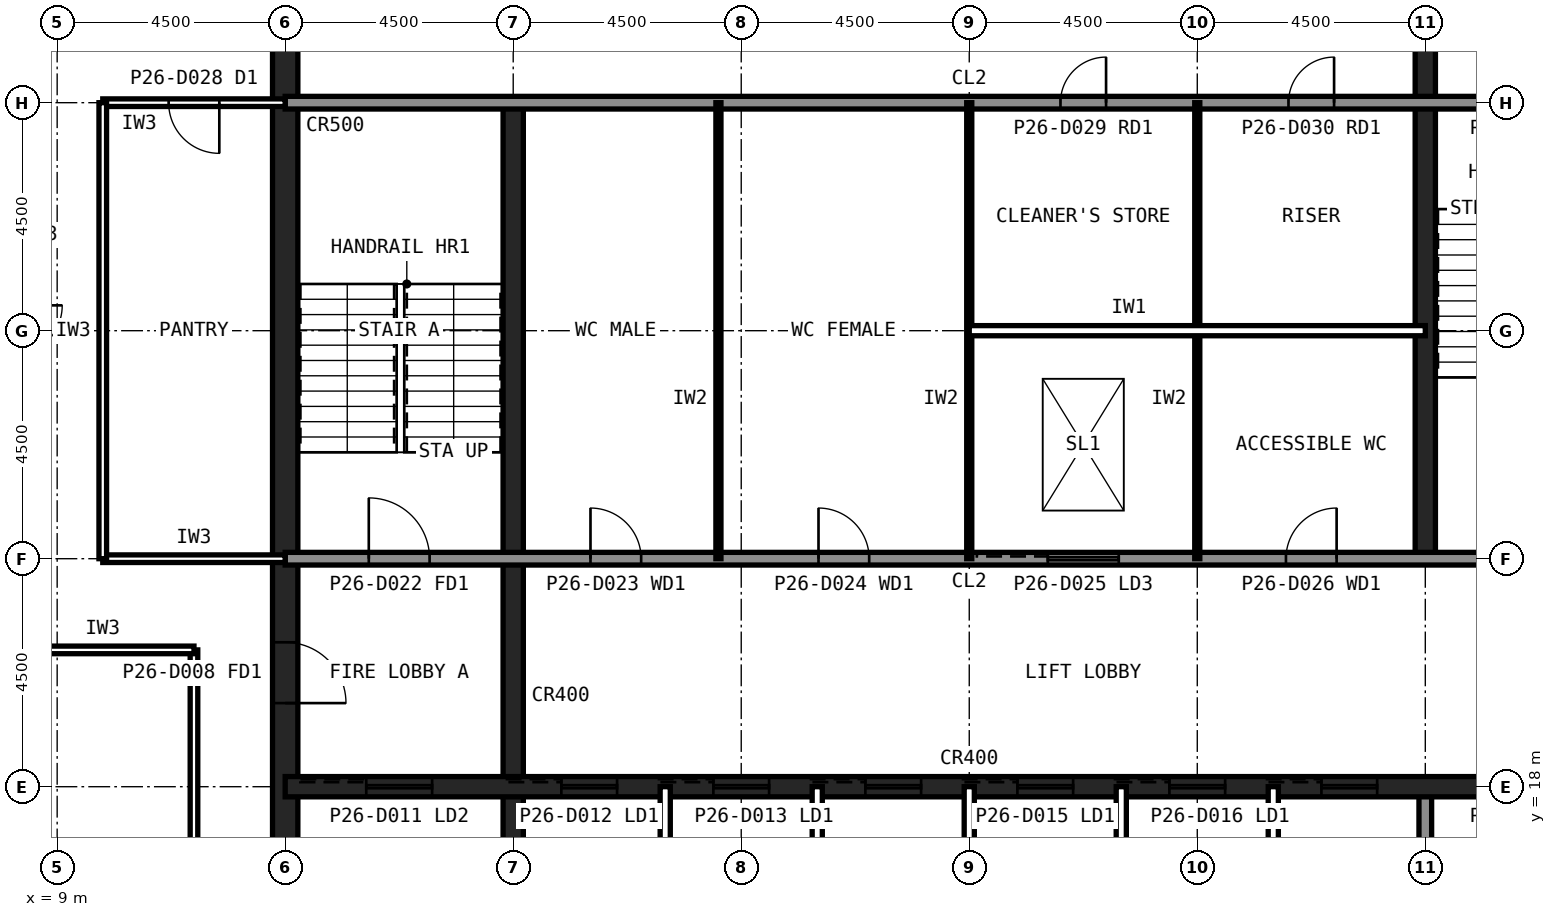
"""IFC4 building model, lengths in metres.
Left out: names, types, materials, properties, quantities, classifications, styles, units other than length and angle.
Written with IfcOpenShell. Run it as: python <this file> out.ifc"""

import sys

from ifc_helpers import new_model, si_unit, direction, frame, frame_2d, origin, place, context, subcontext, project, spatial, rectangle, extrude, element, fill, save


model = new_model("IFC4")
c1 = context("Model", 3, precision=1e-05, world=origin(), true_north=direction((0.0, 1.0)))
c2 = subcontext(c1, "Body", "Model", "MODEL_VIEW")
j1 = project(units=[si_unit("LENGTHUNIT", "METRE"), si_unit("PLANEANGLEUNIT", "RADIAN")], contexts=[c1])
p1 = place(None, origin())
s1 = spatial("IfcSite", under=j1, at=p1, CompositionType="ELEMENT")
p2 = place(p1, origin())
s2 = spatial("IfcBuilding", under=s1, at=p2, CompositionType="ELEMENT")
p3 = place(p2, frame((0.0, 0.0, 115.6)))
s3 = spatial("IfcBuildingStorey", under=s2, at=p3, CompositionType="ELEMENT", Elevation=115.6)
p4 = place(p3, frame((13.5, 40.5, 0.0), z_axis=(0.0, 0.0, 1.0), x_axis=(0.0, -1.0, 0.0)))
e1 = element("IfcWall", 1, at=p4, inside=s3, PredefinedType="SHEAR", context=c2, shape_type="SweptSolid", body=[
    extrude(rectangle(XDim=27.0, YDim=0.5, at=frame_2d((13.5, 0.0))), origin(), (0.0, 0.0, 1.0), 4.0),
])
p5 = place(p4, frame((19.65, 0.0, 0.0)))
e2 = element("IfcOpeningElement", 2, at=p5, cuts=e1, PredefinedType="OPENING", context=c2, shape_type="SweptSolid", body=[
    extrude(rectangle(XDim=1.2, YDim=2.1, at=frame_2d((0.6, 1.05))), frame((0.0, 0.26, 0.0), z_axis=(0.0, -1.0, 0.0), x_axis=(1.0, 0.0, 0.0)), (0.0, 0.0, 1.0), 0.52),
])
p6 = place(p4, frame((5.85, 0.0, 0.0)))
e3 = element("IfcOpeningElement", 3, at=p6, cuts=e1, PredefinedType="OPENING", context=c2, shape_type="SweptSolid", body=[
    extrude(rectangle(XDim=1.8, YDim=2.1, at=frame_2d((0.9, 1.05))), frame((0.0, 0.26, 0.0), z_axis=(0.0, -1.0, 0.0), x_axis=(1.0, 0.0, 0.0)), (0.0, 0.0, 1.0), 0.52),
])
p7 = place(p3, frame((18.0, 13.5, 0.0), z_axis=(0.0, 0.0, 1.0), x_axis=(0.0, 1.0, 0.0)))
e4 = element("IfcWall", 4, at=p7, inside=s3, PredefinedType="SHEAR", context=c2, shape_type="SweptSolid", body=[
    extrude(rectangle(XDim=18.0, YDim=0.4, at=frame_2d((9.0, 0.0))), origin(), (0.0, 0.0, 1.0), 4.0),
])
p8 = place(p3, frame((36.0, 13.5, 0.0), z_axis=(0.0, 0.0, 1.0), x_axis=(0.0, 1.0, 0.0)))
e5 = element("IfcWall", 5, at=p8, inside=s3, PredefinedType="SOLIDWALL", context=c2, shape_type="SweptSolid", body=[
    extrude(rectangle(XDim=4.5, YDim=0.25, at=frame_2d((2.25, 0.0))), origin(), (0.0, 0.0, 1.0), 3.84),
])
p9 = place(p3, frame((36.0, 22.5, 0.0), z_axis=(0.0, 0.0, 1.0), x_axis=(0.0, 1.0, 0.0)))
e6 = element("IfcWall", 6, at=p9, inside=s3, PredefinedType="SHEAR", context=c2, shape_type="SweptSolid", body=[
    extrude(rectangle(XDim=18.0, YDim=0.4, at=frame_2d((9.0, 0.0))), origin(), (0.0, 0.0, 1.0), 4.0),
])
p10 = place(p3, frame((13.5, 18.0, 0.0), z_axis=(0.0, 0.0, 1.0), x_axis=(1.0, 0.0, 0.0)))
e7 = element("IfcWall", 7, at=p10, inside=s3, PredefinedType="SHEAR", context=c2, shape_type="SweptSolid", body=[
    extrude(rectangle(XDim=27.0, YDim=0.4, at=frame_2d((13.5, 0.0))), origin(), (0.0, 0.0, 1.0), 4.0),
])
p11 = place(p10, frame((24.3, 0.0, 0.0)))
e8 = element("IfcOpeningElement", 8, at=p11, cuts=e7, PredefinedType="OPENING", context=c2, shape_type="SweptSolid", body=[
    extrude(rectangle(XDim=0.9, YDim=2.1, at=frame_2d((0.45, 1.05))), frame((0.0, 0.21, 0.0), z_axis=(0.0, -1.0, 0.0), x_axis=(1.0, 0.0, 0.0)), (0.0, 0.0, 1.0), 0.42),
])
p12 = place(p10, frame((5.45, 0.0, 0.0)))
e9 = element("IfcOpeningElement", 9, at=p12, cuts=e7, PredefinedType="OPENING", context=c2, shape_type="SweptSolid", body=[
    extrude(rectangle(XDim=1.1, YDim=2.1, at=frame_2d((0.55, 1.05))), frame((0.0, 0.21, 0.0), z_axis=(0.0, -1.0, 0.0), x_axis=(1.0, 0.0, 0.0)), (0.0, 0.0, 1.0), 0.42),
])
p13 = place(p10, frame((8.45, 0.0, 0.0)))
e10 = element("IfcOpeningElement", 10, at=p13, cuts=e7, PredefinedType="OPENING", context=c2, shape_type="SweptSolid", body=[
    extrude(rectangle(XDim=1.1, YDim=2.1, at=frame_2d((0.55, 1.05))), frame((0.0, 0.21, 0.0), z_axis=(0.0, -1.0, 0.0), x_axis=(1.0, 0.0, 0.0)), (0.0, 0.0, 1.0), 0.42),
])
p14 = place(p10, frame((11.45, 0.0, 0.0)))
e11 = element("IfcOpeningElement", 11, at=p14, cuts=e7, PredefinedType="OPENING", context=c2, shape_type="SweptSolid", body=[
    extrude(rectangle(XDim=1.1, YDim=2.1, at=frame_2d((0.55, 1.05))), frame((0.0, 0.21, 0.0), z_axis=(0.0, -1.0, 0.0), x_axis=(1.0, 0.0, 0.0)), (0.0, 0.0, 1.0), 0.42),
])
p15 = place(p10, frame((14.45, 0.0, 0.0)))
e12 = element("IfcOpeningElement", 12, at=p15, cuts=e7, PredefinedType="OPENING", context=c2, shape_type="SweptSolid", body=[
    extrude(rectangle(XDim=1.1, YDim=2.1, at=frame_2d((0.55, 1.05))), frame((0.0, 0.21, 0.0), z_axis=(0.0, -1.0, 0.0), x_axis=(1.0, 0.0, 0.0)), (0.0, 0.0, 1.0), 0.42),
])
p16 = place(p10, frame((17.45, 0.0, 0.0)))
e13 = element("IfcOpeningElement", 13, at=p16, cuts=e7, PredefinedType="OPENING", context=c2, shape_type="SweptSolid", body=[
    extrude(rectangle(XDim=1.1, YDim=2.1, at=frame_2d((0.55, 1.05))), frame((0.0, 0.21, 0.0), z_axis=(0.0, -1.0, 0.0), x_axis=(1.0, 0.0, 0.0)), (0.0, 0.0, 1.0), 0.42),
])
p17 = place(p10, frame((20.45, 0.0, 0.0)))
e14 = element("IfcOpeningElement", 14, at=p17, cuts=e7, PredefinedType="OPENING", context=c2, shape_type="SweptSolid", body=[
    extrude(rectangle(XDim=1.1, YDim=2.1, at=frame_2d((0.55, 1.05))), frame((0.0, 0.21, 0.0), z_axis=(0.0, -1.0, 0.0), x_axis=(1.0, 0.0, 0.0)), (0.0, 0.0, 1.0), 0.42),
])
p18 = place(p10, frame((1.6, 0.0, 0.0)))
e15 = element("IfcOpeningElement", 15, at=p18, cuts=e7, PredefinedType="OPENING", context=c2, shape_type="SweptSolid", body=[
    extrude(rectangle(XDim=1.3, YDim=2.2, at=frame_2d((0.65, 1.1))), frame((0.0, 0.21, 0.0), z_axis=(0.0, -1.0, 0.0), x_axis=(1.0, 0.0, 0.0)), (0.0, 0.0, 1.0), 0.42),
])
p19 = place(p3, frame((13.5, 22.5, 0.0), z_axis=(0.0, 0.0, 1.0), x_axis=(1.0, 0.0, 0.0)))
e16 = element("IfcWall", 16, at=p19, inside=s3, PredefinedType="SOLIDWALL", context=c2, shape_type="SweptSolid", body=[
    extrude(rectangle(XDim=27.0, YDim=0.25, at=frame_2d((13.5, 0.0))), origin(), (0.0, 0.0, 1.0), 3.84),
])
p20 = place(p19, frame((1.65, 0.0, 0.0)))
e17 = element("IfcOpeningElement", 17, at=p20, cuts=e16, PredefinedType="OPENING", context=c2, shape_type="SweptSolid", body=[
    extrude(rectangle(XDim=1.2, YDim=2.1, at=frame_2d((0.6, 1.05))), frame((0.0, 0.135, 0.0), z_axis=(0.0, -1.0, 0.0), x_axis=(1.0, 0.0, 0.0)), (0.0, 0.0, 1.0), 0.27),
])
p21 = place(p19, frame((6.025, 0.0, 0.0)))
e18 = element("IfcOpeningElement", 18, at=p21, cuts=e16, PredefinedType="OPENING", context=c2, shape_type="SweptSolid", body=[
    extrude(rectangle(XDim=1.0, YDim=2.1, at=frame_2d((0.5, 1.05))), frame((0.0, 0.135, 0.0), z_axis=(0.0, -1.0, 0.0), x_axis=(1.0, 0.0, 0.0)), (0.0, 0.0, 1.0), 0.27),
])
p22 = place(p19, frame((10.525, 0.0, 0.0)))
e19 = element("IfcOpeningElement", 19, at=p22, cuts=e16, PredefinedType="OPENING", context=c2, shape_type="SweptSolid", body=[
    extrude(rectangle(XDim=1.0, YDim=2.1, at=frame_2d((0.5, 1.05))), frame((0.0, 0.135, 0.0), z_axis=(0.0, -1.0, 0.0), x_axis=(1.0, 0.0, 0.0)), (0.0, 0.0, 1.0), 0.27),
])
p23 = place(p19, frame((19.75, 0.0, 0.0)))
e20 = element("IfcOpeningElement", 20, at=p23, cuts=e16, PredefinedType="OPENING", context=c2, shape_type="SweptSolid", body=[
    extrude(rectangle(XDim=1.0, YDim=2.1, at=frame_2d((0.5, 1.05))), frame((0.0, 0.135, 0.0), z_axis=(0.0, -1.0, 0.0), x_axis=(1.0, 0.0, 0.0)), (0.0, 0.0, 1.0), 0.27),
])
p24 = place(p19, frame((15.05, 0.0, 0.0)))
e21 = element("IfcOpeningElement", 21, at=p24, cuts=e16, PredefinedType="OPENING", context=c2, shape_type="SweptSolid", body=[
    extrude(rectangle(XDim=1.4, YDim=2.4, at=frame_2d((0.7, 1.2))), frame((0.0, 0.135, 0.0), z_axis=(0.0, -1.0, 0.0), x_axis=(1.0, 0.0, 0.0)), (0.0, 0.0, 1.0), 0.27),
])
p25 = place(p3, frame((13.5, 31.5, 0.0), z_axis=(0.0, 0.0, 1.0), x_axis=(1.0, 0.0, 0.0)))
e22 = element("IfcWall", 22, at=p25, inside=s3, PredefinedType="SOLIDWALL", context=c2, shape_type="SweptSolid", body=[
    extrude(rectangle(XDim=27.0, YDim=0.25, at=frame_2d((13.5, 0.0))), origin(), (0.0, 0.0, 1.0), 3.84),
])
p26 = place(p25, frame((24.15, 0.0, 0.0)))
e23 = element("IfcOpeningElement", 23, at=p26, cuts=e22, PredefinedType="OPENING", context=c2, shape_type="SweptSolid", body=[
    extrude(rectangle(XDim=1.2, YDim=2.1, at=frame_2d((0.6, 1.05))), frame((0.0, 0.135, 0.0), z_axis=(0.0, -1.0, 0.0), x_axis=(1.0, 0.0, 0.0)), (0.0, 0.0, 1.0), 0.27),
])
p27 = place(p25, frame((15.3, 0.0, 0.0)))
e24 = element("IfcOpeningElement", 24, at=p27, cuts=e22, PredefinedType="OPENING", context=c2, shape_type="SweptSolid", body=[
    extrude(rectangle(XDim=0.9, YDim=2.1, at=frame_2d((0.45, 1.05))), frame((0.0, 0.135, 0.0), z_axis=(0.0, -1.0, 0.0), x_axis=(1.0, 0.0, 0.0)), (0.0, 0.0, 1.0), 0.27),
])
p28 = place(p25, frame((19.8, 0.0, 0.0)))
e25 = element("IfcOpeningElement", 25, at=p28, cuts=e22, PredefinedType="OPENING", context=c2, shape_type="SweptSolid", body=[
    extrude(rectangle(XDim=0.9, YDim=2.1, at=frame_2d((0.45, 1.05))), frame((0.0, 0.135, 0.0), z_axis=(0.0, -1.0, 0.0), x_axis=(1.0, 0.0, 0.0)), (0.0, 0.0, 1.0), 0.27),
])
for number, where, z_axis, x_axis in (
    (26, (21.0, 13.5, 0.0), (0.0, 0.0, 1.0), (0.0, 1.0, 0.0)),
    (27, (24.0, 13.5, 0.0), (0.0, 0.0, 1.0), (0.0, 1.0, 0.0)),
    (28, (27.0, 13.5, 0.0), (0.0, 0.0, 1.0), (0.0, 1.0, 0.0)),
    (29, (30.0, 13.5, 0.0), (0.0, 0.0, 1.0), (0.0, 1.0, 0.0)),
    (30, (33.0, 13.5, 0.0), (0.0, 0.0, 1.0), (0.0, 1.0, 0.0)),
):
    element("IfcWall", number, at=place(p3, frame(where, z_axis=z_axis, x_axis=x_axis)), inside=s3, PredefinedType="PARTITIONING", context=c2, shape_type="SweptSolid", body=[
        extrude(rectangle(XDim=4.5, YDim=0.2, at=frame_2d((2.25, 0.0))), origin(), (0.0, 0.0, 1.0), 3.84),
    ])
for number, where, z_axis, x_axis in (
    (31, (22.05, 22.5, 0.0), (0.0, 0.0, 1.0), (0.0, 1.0, 0.0)),
    (32, (27.0, 22.5, 0.0), (0.0, 0.0, 1.0), (0.0, 1.0, 0.0)),
    (33, (31.5, 22.5, 0.0), (0.0, 0.0, 1.0), (0.0, 1.0, 0.0)),
):
    element("IfcWall", number, at=place(p3, frame(where, z_axis=z_axis, x_axis=x_axis)), inside=s3, PredefinedType="PLUMBINGWALL", context=c2, shape_type="SweptSolid", body=[
        extrude(rectangle(XDim=9.0, YDim=0.1, at=frame_2d((4.5, 0.0))), origin(), (0.0, 0.0, 1.0), 3.84),
    ])
p29 = place(p3, frame((27.0, 27.0, 0.0), z_axis=(0.0, 0.0, 1.0), x_axis=(1.0, 0.0, 0.0)))
e34 = element("IfcWall", 34, at=p29, inside=s3, PredefinedType="PARTITIONING", context=c2, shape_type="SweptSolid", body=[
    extrude(rectangle(XDim=9.0, YDim=0.2, at=frame_2d((4.5, 0.0))), origin(), (0.0, 0.0, 1.0), 3.84),
])
p30 = place(p3, frame((11.7, 20.7, 0.0), z_axis=(0.0, 0.0, 1.0), x_axis=(0.0, -1.0, 0.0)))
e35 = element("IfcWall", 35, at=p30, inside=s3, PredefinedType="PARTITIONING", context=c2, shape_type="SweptSolid", body=[
    extrude(rectangle(XDim=9.0, YDim=0.15, at=frame_2d((4.5, 0.0))), origin(), (0.0, 0.0, 1.0), 3.84),
])
p31 = place(p3, frame((8.1, 20.7, 0.0), z_axis=(0.0, 0.0, 1.0), x_axis=(1.0, 0.0, 0.0)))
e36 = element("IfcWall", 36, at=p31, inside=s3, PredefinedType="PARTITIONING", context=c2, shape_type="SweptSolid", body=[
    extrude(rectangle(XDim=3.6, YDim=0.15, at=frame_2d((1.8, 0.0))), origin(), (0.0, 0.0, 1.0), 3.84),
])
p32 = place(p3, frame((9.9, 22.5, 0.0), z_axis=(0.0, 0.0, 1.0), x_axis=(1.0, 0.0, 0.0)))
e37 = element("IfcWall", 37, at=p32, inside=s3, PredefinedType="PARTITIONING", context=c2, shape_type="SweptSolid", body=[
    extrude(rectangle(XDim=3.6, YDim=0.15, at=frame_2d((1.8, 0.0))), origin(), (0.0, 0.0, 1.0), 2.989),
])
p33 = place(p3, frame((13.5, 31.5, 0.0), z_axis=(0.0, 0.0, 1.0), x_axis=(-1.0, 0.0, 0.0)))
e38 = element("IfcWall", 38, at=p33, inside=s3, PredefinedType="PARTITIONING", context=c2, shape_type="SweptSolid", body=[
    extrude(rectangle(XDim=3.6, YDim=0.15, at=frame_2d((1.8, 0.0))), origin(), (0.0, 0.0, 1.0), 2.989),
])
p34 = place(p33, frame((1.3, 0.0, 0.0)))
e39 = element("IfcOpeningElement", 39, at=p34, cuts=e38, PredefinedType="OPENING", context=c2, shape_type="SweptSolid", body=[
    extrude(rectangle(XDim=1.0, YDim=2.1, at=frame_2d((0.5, 1.05))), frame((0.0, 0.085, 0.0), z_axis=(0.0, -1.0, 0.0), x_axis=(1.0, 0.0, 0.0)), (0.0, 0.0, 1.0), 0.17),
])
p35 = place(p3, frame((9.9, 31.5, 0.0), z_axis=(0.0, 0.0, 1.0), x_axis=(0.0, -1.0, 0.0)))
e40 = element("IfcWall", 40, at=p35, inside=s3, PredefinedType="PARTITIONING", context=c2, shape_type="SweptSolid", body=[
    extrude(rectangle(XDim=9.0, YDim=0.15, at=frame_2d((4.5, 0.0))), origin(), (0.0, 0.0, 1.0), 3.84),
])
p36 = place(p5, origin())
e41 = element("IfcDoor", 41, at=p36, inside=s3, OperationType="SINGLE_SWING_RIGHT", PredefinedType="DOOR", context=c2, shape_type="SweptSolid", body=[
    extrude(rectangle(XDim=1.2, YDim=2.1, at=frame_2d((0.6, 1.05))), frame((0.0, 0.025, 0.0), z_axis=(0.0, -1.0, 0.0), x_axis=(1.0, 0.0, 0.0)), (0.0, 0.0, 1.0), 0.05),
])
fill(e2, e41)
p37 = place(p20, origin())
e42 = element("IfcDoor", 42, at=p37, inside=s3, OperationType="SINGLE_SWING_LEFT", PredefinedType="DOOR", context=c2, shape_type="SweptSolid", body=[
    extrude(rectangle(XDim=1.2, YDim=2.1, at=frame_2d((0.6, 1.05))), frame((0.0, 0.025, 0.0), z_axis=(0.0, -1.0, 0.0), x_axis=(1.0, 0.0, 0.0)), (0.0, 0.0, 1.0), 0.05),
])
fill(e17, e42)
p38 = place(p21, origin())
e43 = element("IfcDoor", 43, at=p38, inside=s3, OperationType="SINGLE_SWING_LEFT", PredefinedType="DOOR", context=c2, shape_type="SweptSolid", body=[
    extrude(rectangle(XDim=1.0, YDim=2.1, at=frame_2d((0.5, 1.05))), frame((0.0, 0.025, 0.0), z_axis=(0.0, -1.0, 0.0), x_axis=(1.0, 0.0, 0.0)), (0.0, 0.0, 1.0), 0.05),
])
fill(e18, e43)
p39 = place(p22, origin())
e44 = element("IfcDoor", 44, at=p39, inside=s3, OperationType="SINGLE_SWING_LEFT", PredefinedType="DOOR", context=c2, shape_type="SweptSolid", body=[
    extrude(rectangle(XDim=1.0, YDim=2.1, at=frame_2d((0.5, 1.05))), frame((0.0, 0.025, 0.0), z_axis=(0.0, -1.0, 0.0), x_axis=(1.0, 0.0, 0.0)), (0.0, 0.0, 1.0), 0.05),
])
fill(e19, e44)
p40 = place(p23, origin())
e45 = element("IfcDoor", 45, at=p40, inside=s3, OperationType="SINGLE_SWING_RIGHT", PredefinedType="DOOR", context=c2, shape_type="SweptSolid", body=[
    extrude(rectangle(XDim=1.0, YDim=2.1, at=frame_2d((0.5, 1.05))), frame((0.0, 0.025, 0.0), z_axis=(0.0, -1.0, 0.0), x_axis=(1.0, 0.0, 0.0)), (0.0, 0.0, 1.0), 0.05),
])
fill(e20, e45)
p41 = place(p27, origin())
e46 = element("IfcDoor", 46, at=p41, inside=s3, OperationType="SINGLE_SWING_RIGHT", PredefinedType="DOOR", context=c2, shape_type="SweptSolid", body=[
    extrude(rectangle(XDim=0.9, YDim=2.1, at=frame_2d((0.45, 1.05))), frame((0.0, 0.025, 0.0), z_axis=(0.0, -1.0, 0.0), x_axis=(1.0, 0.0, 0.0)), (0.0, 0.0, 1.0), 0.05),
])
fill(e24, e46)
p42 = place(p28, origin())
e47 = element("IfcDoor", 47, at=p42, inside=s3, OperationType="SINGLE_SWING_RIGHT", PredefinedType="DOOR", context=c2, shape_type="SweptSolid", body=[
    extrude(rectangle(XDim=0.9, YDim=2.1, at=frame_2d((0.45, 1.05))), frame((0.0, 0.025, 0.0), z_axis=(0.0, -1.0, 0.0), x_axis=(1.0, 0.0, 0.0)), (0.0, 0.0, 1.0), 0.05),
])
fill(e25, e47)
p43 = place(p12, origin())
e48 = element("IfcDoor", 48, at=p43, inside=s3, OperationType="SLIDING_TO_LEFT", PredefinedType="DOOR", context=c2, shape_type="SweptSolid", body=[
    extrude(rectangle(XDim=1.1, YDim=2.1, at=frame_2d((0.55, 1.05))), frame((0.0, 0.025, 0.0), z_axis=(0.0, -1.0, 0.0), x_axis=(1.0, 0.0, 0.0)), (0.0, 0.0, 1.0), 0.05),
])
fill(e9, e48)
p44 = place(p13, origin())
e49 = element("IfcDoor", 49, at=p44, inside=s3, OperationType="SLIDING_TO_LEFT", PredefinedType="DOOR", context=c2, shape_type="SweptSolid", body=[
    extrude(rectangle(XDim=1.1, YDim=2.1, at=frame_2d((0.55, 1.05))), frame((0.0, 0.025, 0.0), z_axis=(0.0, -1.0, 0.0), x_axis=(1.0, 0.0, 0.0)), (0.0, 0.0, 1.0), 0.05),
])
fill(e10, e49)
p45 = place(p14, origin())
e50 = element("IfcDoor", 50, at=p45, inside=s3, OperationType="SLIDING_TO_LEFT", PredefinedType="DOOR", context=c2, shape_type="SweptSolid", body=[
    extrude(rectangle(XDim=1.1, YDim=2.1, at=frame_2d((0.55, 1.05))), frame((0.0, 0.025, 0.0), z_axis=(0.0, -1.0, 0.0), x_axis=(1.0, 0.0, 0.0)), (0.0, 0.0, 1.0), 0.05),
])
fill(e11, e50)
p46 = place(p15, origin())
e51 = element("IfcDoor", 51, at=p46, inside=s3, OperationType="SLIDING_TO_LEFT", PredefinedType="DOOR", context=c2, shape_type="SweptSolid", body=[
    extrude(rectangle(XDim=1.1, YDim=2.1, at=frame_2d((0.55, 1.05))), frame((0.0, 0.025, 0.0), z_axis=(0.0, -1.0, 0.0), x_axis=(1.0, 0.0, 0.0)), (0.0, 0.0, 1.0), 0.05),
])
fill(e12, e51)
p47 = place(p16, origin())
e52 = element("IfcDoor", 52, at=p47, inside=s3, OperationType="SLIDING_TO_LEFT", PredefinedType="DOOR", context=c2, shape_type="SweptSolid", body=[
    extrude(rectangle(XDim=1.1, YDim=2.1, at=frame_2d((0.55, 1.05))), frame((0.0, 0.025, 0.0), z_axis=(0.0, -1.0, 0.0), x_axis=(1.0, 0.0, 0.0)), (0.0, 0.0, 1.0), 0.05),
])
fill(e13, e52)
p48 = place(p17, origin())
e53 = element("IfcDoor", 53, at=p48, inside=s3, OperationType="SLIDING_TO_LEFT", PredefinedType="DOOR", context=c2, shape_type="SweptSolid", body=[
    extrude(rectangle(XDim=1.1, YDim=2.1, at=frame_2d((0.55, 1.05))), frame((0.0, 0.025, 0.0), z_axis=(0.0, -1.0, 0.0), x_axis=(1.0, 0.0, 0.0)), (0.0, 0.0, 1.0), 0.05),
])
fill(e14, e53)
p49 = place(p18, origin())
e54 = element("IfcDoor", 54, at=p49, inside=s3, OperationType="SLIDING_TO_LEFT", PredefinedType="DOOR", context=c2, shape_type="SweptSolid", body=[
    extrude(rectangle(XDim=1.3, YDim=2.2, at=frame_2d((0.65, 1.1))), frame((0.0, 0.025, 0.0), z_axis=(0.0, -1.0, 0.0), x_axis=(1.0, 0.0, 0.0)), (0.0, 0.0, 1.0), 0.05),
])
fill(e15, e54)
p50 = place(p24, origin())
e55 = element("IfcDoor", 55, at=p50, inside=s3, OperationType="SLIDING_TO_LEFT", PredefinedType="DOOR", context=c2, shape_type="SweptSolid", body=[
    extrude(rectangle(XDim=1.4, YDim=2.4, at=frame_2d((0.7, 1.2))), frame((0.0, 0.025, 0.0), z_axis=(0.0, -1.0, 0.0), x_axis=(1.0, 0.0, 0.0)), (0.0, 0.0, 1.0), 0.05),
])
fill(e21, e55)
p51 = place(p34, origin())
e56 = element("IfcDoor", 56, at=p51, inside=s3, OperationType="SINGLE_SWING_LEFT", PredefinedType="DOOR", context=c2, shape_type="SweptSolid", body=[
    extrude(rectangle(XDim=1.0, YDim=2.1, at=frame_2d((0.5, 1.05))), frame((0.0, 0.025, 0.0), z_axis=(0.0, -1.0, 0.0), x_axis=(1.0, 0.0, 0.0)), (0.0, 0.0, 1.0), 0.05),
])
fill(e39, e56)
save(model, sys.argv[1])
